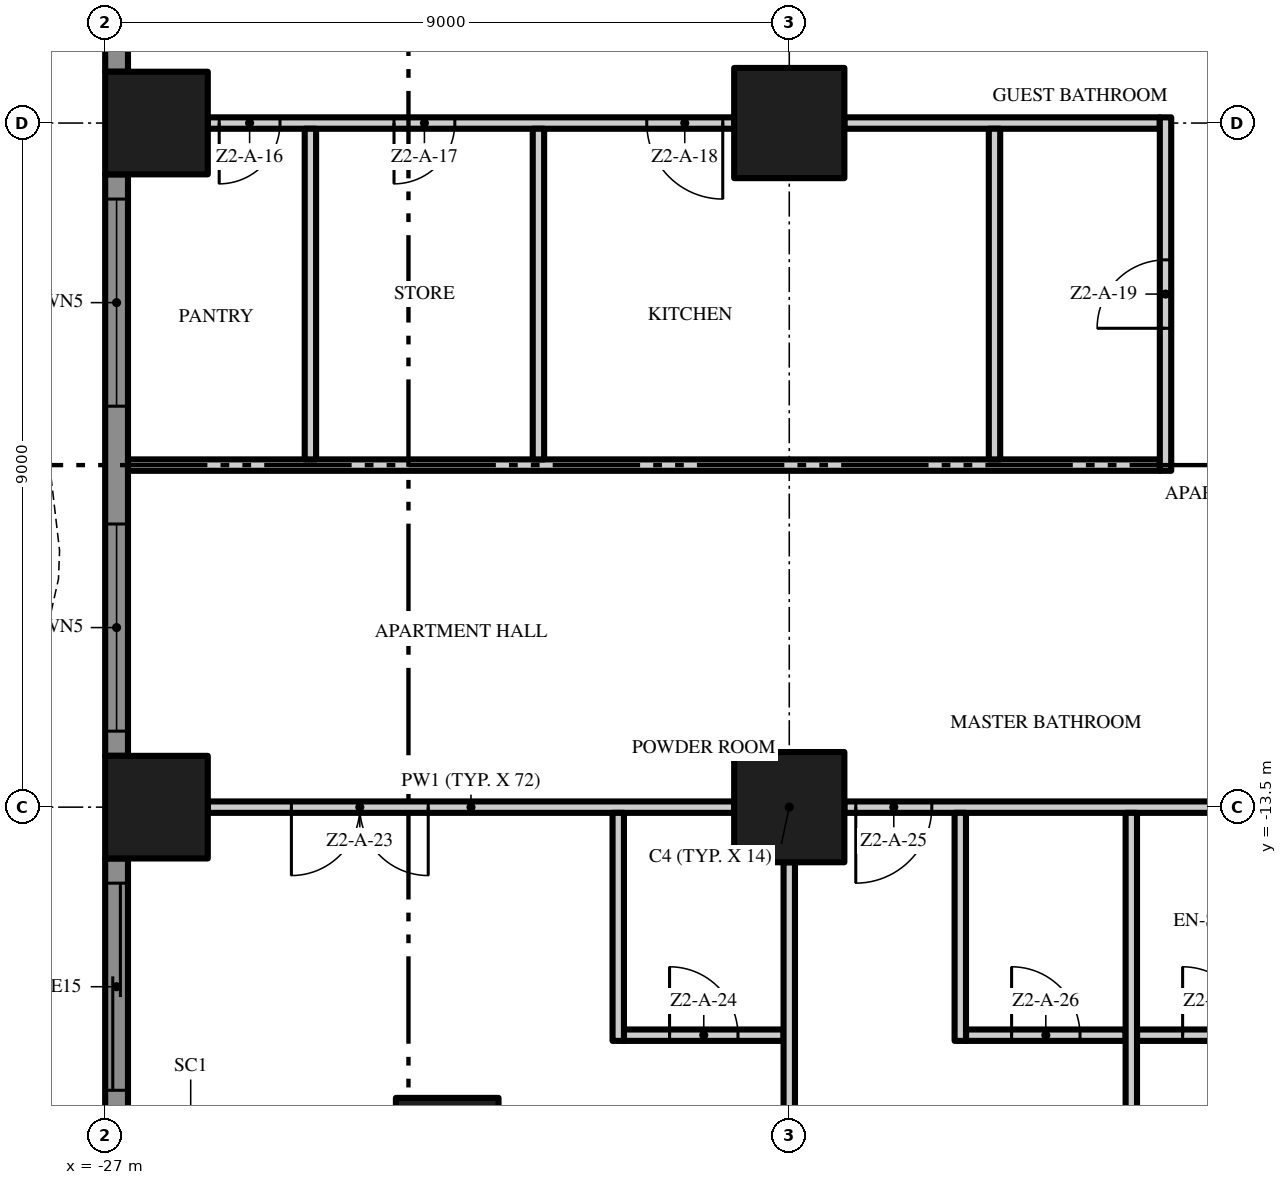
"""IFC4 building model, lengths in metres.
Left out: names, types, materials, properties, quantities, classifications, styles, units other than length and angle.
Written with IfcOpenShell. Run it as: python <this file> out.ifc"""

import sys

from ifc_helpers import new_model, si_unit, direction, frame, frame_2d, origin, origin_2d, place, context, subcontext, project, spatial, polyline, rectangle, outline, extrude, element, fill, save


model = new_model("IFC4")
c1 = context("Model", 3, precision=1e-05, world=origin(), true_north=direction((0.0, 1.0)))
c2 = subcontext(c1, "Body", "Model", "MODEL_VIEW")
j1 = project(units=[si_unit("LENGTHUNIT", "METRE"), si_unit("PLANEANGLEUNIT", "RADIAN")], contexts=[c1])
p1 = place(None, origin())
s1 = spatial("IfcSite", under=j1, at=p1, CompositionType="ELEMENT")
p2 = place(p1, origin())
s2 = spatial("IfcBuilding", under=s1, at=p2, CompositionType="ELEMENT")
p3 = place(p2, frame((0.0, 0.0, 73.2)))
s3 = spatial("IfcBuildingStorey", under=s2, at=p3, CompositionType="ELEMENT", Elevation=73.2)
for number, where, z_axis, x_axis in (
    (1, (-18.0, -13.5, 0.0), (0.0, 0.0, 1.0), (1.0, 0.0, 0.0)),
    (2, (-18.0, -4.5, 0.0), (0.0, 0.0, 1.0), (1.0, 0.0, 0.0)),
):
    element("IfcColumn", number, at=place(p3, frame(where, z_axis=z_axis, x_axis=x_axis)), inside=s3, PredefinedType="COLUMN", context=c2, shape_type="SweptSolid", body=[
        extrude(rectangle(XDim=1.45, YDim=1.45, at=origin_2d()), origin(), (0.0, 0.0, 1.0), 3.5),
    ])
for number, where, z_axis, x_axis in (
    (3, (-26.325, -13.5, 0.0), (0.0, 0.0, 1.0), (1.0, 0.0, 0.0)),
    (4, (-22.5, -18.0, 0.0), (0.0, 0.0, 1.0), (1.0, 0.0, 0.0)),
    (5, (-26.325, -4.5, 0.0), (0.0, 0.0, 1.0), (1.0, 0.0, 0.0)),
):
    element("IfcColumn", number, at=place(p3, frame(where, z_axis=z_axis, x_axis=x_axis)), inside=s3, PredefinedType="COLUMN", context=c2, shape_type="SweptSolid", body=[
        extrude(rectangle(XDim=1.35, YDim=1.35, at=origin_2d()), origin(), (0.0, 0.0, 1.0), 3.5),
    ])
p4 = place(p3, frame((-26.85, -3.825, 0.0), z_axis=(0.0, 0.0, 1.0), x_axis=(0.0, 1.0, 0.0)))
e6 = element("IfcWall", 6, at=p4, inside=s3, PredefinedType="SOLIDWALL", context=c2, shape_type="SweptSolid", body=[
    extrude(rectangle(XDim=7.65, YDim=0.3, at=frame_2d((3.825, 0.0))), origin(), (0.0, 0.0, 1.0), 3.5),
])
p5 = place(p4, frame((4.6, 0.0, 0.45)))
e7 = element("IfcOpeningElement", 7, at=p5, cuts=e6, PredefinedType="OPENING", context=c2, shape_type="SweptSolid", body=[
    extrude(rectangle(XDim=2.725, YDim=2.65, at=frame_2d((1.363, 1.325))), frame((0.0, 0.16, 0.0), z_axis=(0.0, -1.0, 0.0), x_axis=(1.0, 0.0, 0.0)), (0.0, 0.0, 1.0), 0.32),
])
p6 = place(p4, frame((0.325, 0.0, 0.0)))
e8 = element("IfcOpeningElement", 8, at=p6, cuts=e6, PredefinedType="OPENING", context=c2, shape_type="SweptSolid", body=[
    extrude(rectangle(XDim=2.725, YDim=2.4, at=frame_2d((1.363, 1.2))), frame((0.0, 0.16, 0.0), z_axis=(0.0, -1.0, 0.0), x_axis=(1.0, 0.0, 0.0)), (0.0, 0.0, 1.0), 0.32),
])
p7 = place(p3, frame((-26.85, -12.825, 0.0), z_axis=(0.0, 0.0, 1.0), x_axis=(0.0, 1.0, 0.0)))
e9 = element("IfcWall", 9, at=p7, inside=s3, PredefinedType="SOLIDWALL", context=c2, shape_type="SweptSolid", body=[
    extrude(rectangle(XDim=7.65, YDim=0.3, at=frame_2d((3.825, 0.0))), origin(), (0.0, 0.0, 1.0), 3.5),
])
p8 = place(p7, frame((4.6, 0.0, 0.45)))
e10 = element("IfcOpeningElement", 10, at=p8, cuts=e9, PredefinedType="OPENING", context=c2, shape_type="SweptSolid", body=[
    extrude(rectangle(XDim=2.725, YDim=2.65, at=frame_2d((1.363, 1.325))), frame((0.0, 0.16, 0.0), z_axis=(0.0, -1.0, 0.0), x_axis=(1.0, 0.0, 0.0)), (0.0, 0.0, 1.0), 0.32),
])
p9 = place(p7, frame((0.325, 0.0, 0.45)))
e11 = element("IfcOpeningElement", 11, at=p9, cuts=e9, PredefinedType="OPENING", context=c2, shape_type="SweptSolid", body=[
    extrude(rectangle(XDim=2.725, YDim=2.65, at=frame_2d((1.363, 1.325))), frame((0.0, 0.16, 0.0), z_axis=(0.0, -1.0, 0.0), x_axis=(1.0, 0.0, 0.0)), (0.0, 0.0, 1.0), 0.32),
])
p10 = place(p3, frame((-26.85, -18.0, 0.0), z_axis=(0.0, 0.0, 1.0), x_axis=(0.0, 1.0, 0.0)))
e12 = element("IfcWall", 12, at=p10, inside=s3, PredefinedType="SOLIDWALL", context=c2, shape_type="SweptSolid", body=[
    extrude(rectangle(XDim=3.825, YDim=0.3, at=frame_2d((1.913, 0.0))), origin(), (0.0, 0.0, 1.0), 3.5),
])
p11 = place(p10, frame((0.775, 0.0, 0.0)))
e13 = element("IfcOpeningElement", 13, at=p11, cuts=e12, PredefinedType="OPENING", context=c2, shape_type="SweptSolid", body=[
    extrude(rectangle(XDim=2.725, YDim=2.4, at=frame_2d((1.363, 1.2))), frame((0.0, 0.16, 0.0), z_axis=(0.0, -1.0, 0.0), x_axis=(1.0, 0.0, 0.0)), (0.0, 0.0, 1.0), 0.32),
])
p12 = place(p3, origin())
e14 = element("IfcWall", 14, at=p12, inside=s3, PredefinedType="USERDEFINED", context=c2, shape_type="SweptSolid", body=[
    extrude(outline(polyline([(-27.951, 18.0), (-28.612, 16.5), (-29.345, 15.0), (-29.869, 13.5), (-30.0, 12.375), (-29.985, 12.0), (-29.649, 10.5), (-28.988, 9.0), (-28.255, 7.5), (-27.731, 6.0), (-27.6, 4.875), (-27.615, 4.5), (-27.951, 3.0), (-28.612, 1.5), (-29.345, 0.0), (-29.869, -1.5), (-30.0, -2.625), (-29.985, -3.0), (-29.649, -4.5), (-28.988, -6.0), (-28.255, -7.5), (-27.731, -9.0), (-27.6, -10.125), (-27.615, -10.5), (-27.951, -12.0), (-28.612, -13.5), (-29.345, -15.0), (-29.869, -16.5), (-30.0, -17.625), (-29.985, -18.0), (-29.735, -17.99), (-29.749, -17.635), (-29.624, -16.556), (-29.114, -15.096), (-28.385, -13.605), (-27.713, -12.079), (-27.366, -10.533), (-27.349, -10.115), (-27.486, -8.944), (-28.024, -7.404), (-28.761, -5.895), (-29.41, -4.421), (-29.736, -2.967), (-29.749, -2.635), (-29.624, -1.556), (-29.114, -0.096), (-28.385, 1.395), (-27.713, 2.921), (-27.366, 4.467), (-27.349, 4.885), (-27.486, 6.056), (-28.024, 7.596), (-28.761, 9.105), (-29.41, 10.579), (-29.736, 12.033), (-29.749, 12.365), (-29.624, 13.444), (-29.114, 14.904), (-28.385, 16.395), (-27.723, 17.899), (-27.951, 18.0)])), origin(), (0.0, 0.0, 1.0), 0.9),
])
p13 = place(p3, frame((-20.175, -16.5, 0.0), z_axis=(0.0, 0.0, 1.0), x_axis=(1.0, 0.0, 0.0)))
e15 = element("IfcWall", 15, at=p13, inside=s3, PredefinedType="PARTITIONING", context=c2, shape_type="SweptSolid", body=[
    extrude(rectangle(XDim=2.1, YDim=0.15, at=frame_2d((1.05, 0.0))), origin(), (0.0, 0.0, 1.0), 3.5),
])
p14 = place(p13, frame((0.6, 0.0, 0.0)))
e16 = element("IfcOpeningElement", 16, at=p14, cuts=e15, PredefinedType="OPENING", context=c2, shape_type="SweptSolid", body=[
    extrude(rectangle(XDim=0.9, YDim=2.1, at=frame_2d((0.45, 1.05))), frame((0.0, 0.085, 0.0), z_axis=(0.0, -1.0, 0.0), x_axis=(1.0, 0.0, 0.0)), (0.0, 0.0, 1.0), 0.17),
])
p15 = place(p3, frame((-15.675, -16.5, 0.0), z_axis=(0.0, 0.0, 1.0), x_axis=(1.0, 0.0, 0.0)))
e17 = element("IfcWall", 17, at=p15, inside=s3, PredefinedType="PARTITIONING", context=c2, shape_type="SweptSolid", body=[
    extrude(rectangle(XDim=2.1, YDim=0.15, at=frame_2d((1.05, 0.0))), origin(), (0.0, 0.0, 1.0), 3.5),
])
p16 = place(p15, frame((0.6, 0.0, 0.0)))
e18 = element("IfcOpeningElement", 18, at=p16, cuts=e17, PredefinedType="OPENING", context=c2, shape_type="SweptSolid", body=[
    extrude(rectangle(XDim=0.9, YDim=2.1, at=frame_2d((0.45, 1.05))), frame((0.0, 0.085, 0.0), z_axis=(0.0, -1.0, 0.0), x_axis=(1.0, 0.0, 0.0)), (0.0, 0.0, 1.0), 0.17),
])
p17 = place(p3, frame((-13.425, -16.5, 0.0), z_axis=(0.0, 0.0, 1.0), x_axis=(1.0, 0.0, 0.0)))
e19 = element("IfcWall", 19, at=p17, inside=s3, PredefinedType="PARTITIONING", context=c2, shape_type="SweptSolid", body=[
    extrude(rectangle(XDim=2.1, YDim=0.15, at=frame_2d((1.05, 0.0))), origin(), (0.0, 0.0, 1.0), 3.5),
])
p18 = place(p17, frame((0.6, 0.0, 0.0)))
e20 = element("IfcOpeningElement", 20, at=p18, cuts=e19, PredefinedType="OPENING", context=c2, shape_type="SweptSolid", body=[
    extrude(rectangle(XDim=0.9, YDim=2.1, at=frame_2d((0.45, 1.05))), frame((0.0, 0.085, 0.0), z_axis=(0.0, -1.0, 0.0), x_axis=(1.0, 0.0, 0.0)), (0.0, 0.0, 1.0), 0.17),
])
p19 = place(p3, frame((-18.725, -13.5, 0.0), z_axis=(0.0, 0.0, 1.0), x_axis=(-1.0, 0.0, 0.0)))
e21 = element("IfcWall", 21, at=p19, inside=s3, PredefinedType="PARTITIONING", context=c2, shape_type="SweptSolid", body=[
    extrude(rectangle(XDim=6.925, YDim=0.15, at=frame_2d((3.462, 0.0))), origin(), (0.0, 0.0, 1.0), 3.5),
])
p20 = place(p19, frame((4.025, 0.0, 0.0)))
e22 = element("IfcOpeningElement", 22, at=p20, cuts=e21, PredefinedType="OPENING", context=c2, shape_type="SweptSolid", body=[
    extrude(rectangle(XDim=1.8, YDim=2.4, at=frame_2d((0.9, 1.2))), frame((0.0, 0.085, 0.0), z_axis=(0.0, -1.0, 0.0), x_axis=(1.0, 0.0, 0.0)), (0.0, 0.0, 1.0), 0.17),
])
p21 = place(p3, frame((-9.725, -13.5, 0.0), z_axis=(0.0, 0.0, 1.0), x_axis=(-1.0, 0.0, 0.0)))
e23 = element("IfcWall", 23, at=p21, inside=s3, PredefinedType="PARTITIONING", context=c2, shape_type="SweptSolid", body=[
    extrude(rectangle(XDim=7.55, YDim=0.15, at=frame_2d((3.775, 0.0))), origin(), (0.0, 0.0, 1.0), 3.5),
])
p22 = place(p21, frame((6.4, 0.0, 0.0)))
e24 = element("IfcOpeningElement", 24, at=p22, cuts=e23, PredefinedType="OPENING", context=c2, shape_type="SweptSolid", body=[
    extrude(rectangle(XDim=1.0, YDim=2.4, at=frame_2d((0.5, 1.2))), frame((0.0, 0.085, 0.0), z_axis=(0.0, -1.0, 0.0), x_axis=(1.0, 0.0, 0.0)), (0.0, 0.0, 1.0), 0.17),
])
p23 = place(p21, frame((0.15, 0.0, 0.0)))
e25 = element("IfcOpeningElement", 25, at=p23, cuts=e23, PredefinedType="OPENING", context=c2, shape_type="SweptSolid", body=[
    extrude(rectangle(XDim=1.0, YDim=2.4, at=frame_2d((0.5, 1.2))), frame((0.0, 0.085, 0.0), z_axis=(0.0, -1.0, 0.0), x_axis=(1.0, 0.0, 0.0)), (0.0, 0.0, 1.0), 0.17),
])
p24 = place(p3, frame((-26.7, -9.0, 0.0), z_axis=(0.0, 0.0, 1.0), x_axis=(1.0, 0.0, 0.0)))
e26 = element("IfcWall", 26, at=p24, inside=s3, PredefinedType="PARTITIONING", context=c2, shape_type="SweptSolid", body=[
    extrude(rectangle(XDim=13.575, YDim=0.15, at=frame_2d((6.787, 0.0))), origin(), (0.0, 0.0, 1.0), 3.5),
])
p25 = place(p3, frame((-18.725, -4.5, 0.0), z_axis=(0.0, 0.0, 1.0), x_axis=(-1.0, 0.0, 0.0)))
e27 = element("IfcWall", 27, at=p25, inside=s3, PredefinedType="PARTITIONING", context=c2, shape_type="SweptSolid", body=[
    extrude(rectangle(XDim=6.925, YDim=0.15, at=frame_2d((3.462, 0.0))), origin(), (0.0, 0.0, 1.0), 3.5),
])
p26 = place(p25, frame((5.975, 0.0, 0.0)))
e28 = element("IfcOpeningElement", 28, at=p26, cuts=e27, PredefinedType="OPENING", context=c2, shape_type="SweptSolid", body=[
    extrude(rectangle(XDim=0.8, YDim=2.0, at=frame_2d((0.4, 1.0))), frame((0.0, 0.085, 0.0), z_axis=(0.0, -1.0, 0.0), x_axis=(1.0, 0.0, 0.0)), (0.0, 0.0, 1.0), 0.17),
])
p27 = place(p25, frame((3.675, 0.0, 0.0)))
e29 = element("IfcOpeningElement", 29, at=p27, cuts=e27, PredefinedType="OPENING", context=c2, shape_type="SweptSolid", body=[
    extrude(rectangle(XDim=0.8, YDim=2.0, at=frame_2d((0.4, 1.0))), frame((0.0, 0.085, 0.0), z_axis=(0.0, -1.0, 0.0), x_axis=(1.0, 0.0, 0.0)), (0.0, 0.0, 1.0), 0.17),
])
p28 = place(p25, frame((0.15, 0.0, 0.0)))
e30 = element("IfcOpeningElement", 30, at=p28, cuts=e27, PredefinedType="OPENING", context=c2, shape_type="SweptSolid", body=[
    extrude(rectangle(XDim=1.0, YDim=2.4, at=frame_2d((0.5, 1.2))), frame((0.0, 0.085, 0.0), z_axis=(0.0, -1.0, 0.0), x_axis=(1.0, 0.0, 0.0)), (0.0, 0.0, 1.0), 0.17),
])
p29 = place(p3, frame((-17.275, -4.5, 0.0), z_axis=(0.0, 0.0, 1.0), x_axis=(1.0, 0.0, 0.0)))
e31 = element("IfcWall", 31, at=p29, inside=s3, PredefinedType="PARTITIONING", context=c2, shape_type="SweptSolid", body=[
    extrude(rectangle(XDim=4.15, YDim=0.15, at=frame_2d((2.075, 0.0))), origin(), (0.0, 0.0, 1.0), 3.5),
])
for number, where, z_axis, x_axis in (
    (32, (-24.3, -8.925, 0.0), (0.0, 0.0, 1.0), (0.0, 1.0, 0.0)),
    (33, (-21.3, -8.925, 0.0), (0.0, 0.0, 1.0), (0.0, 1.0, 0.0)),
):
    element("IfcWall", number, at=place(p3, frame(where, z_axis=z_axis, x_axis=x_axis)), inside=s3, PredefinedType="PARTITIONING", context=c2, shape_type="SweptSolid", body=[
        extrude(rectangle(XDim=4.35, YDim=0.15, at=frame_2d((2.175, 0.0))), origin(), (0.0, 0.0, 1.0), 3.5),
    ])
p30 = place(p3, frame((-20.25, -16.575, 0.0), z_axis=(0.0, 0.0, 1.0), x_axis=(0.0, 1.0, 0.0)))
e34 = element("IfcWall", 34, at=p30, inside=s3, PredefinedType="PARTITIONING", context=c2, shape_type="SweptSolid", body=[
    extrude(rectangle(XDim=3.0, YDim=0.15, at=frame_2d((1.5, 0.0))), origin(), (0.0, 0.0, 1.0), 3.5),
])
p31 = place(p3, frame((-18.0, -21.15, 0.0), z_axis=(0.0, 0.0, 1.0), x_axis=(0.0, 1.0, 0.0)))
e35 = element("IfcWall", 35, at=p31, inside=s3, PredefinedType="PARTITIONING", context=c2, shape_type="SweptSolid", body=[
    extrude(rectangle(XDim=6.925, YDim=0.15, at=frame_2d((3.462, 0.0))), origin(), (0.0, 0.0, 1.0), 3.5),
])
p32 = place(p3, frame((-15.75, -16.575, 0.0), z_axis=(0.0, 0.0, 1.0), x_axis=(0.0, 1.0, 0.0)))
e36 = element("IfcWall", 36, at=p32, inside=s3, PredefinedType="PARTITIONING", context=c2, shape_type="SweptSolid", body=[
    extrude(rectangle(XDim=3.0, YDim=0.15, at=frame_2d((1.5, 0.0))), origin(), (0.0, 0.0, 1.0), 3.5),
])
p33 = place(p3, frame((-15.3, -8.925, 0.0), z_axis=(0.0, 0.0, 1.0), x_axis=(0.0, 1.0, 0.0)))
e37 = element("IfcWall", 37, at=p33, inside=s3, PredefinedType="PARTITIONING", context=c2, shape_type="SweptSolid", body=[
    extrude(rectangle(XDim=4.35, YDim=0.15, at=frame_2d((2.175, 0.0))), origin(), (0.0, 0.0, 1.0), 3.5),
])
p34 = place(p3, frame((-13.5, -22.2, 0.0), z_axis=(0.0, 0.0, 1.0), x_axis=(0.0, 1.0, 0.0)))
e38 = element("IfcWall", 38, at=p34, inside=s3, PredefinedType="PARTITIONING", context=c2, shape_type="SweptSolid", body=[
    extrude(rectangle(XDim=8.625, YDim=0.15, at=frame_2d((4.312, 0.0))), origin(), (0.0, 0.0, 1.0), 3.5),
])
p35 = place(p3, frame((-13.05, -9.075, 0.0), z_axis=(0.0, 0.0, 1.0), x_axis=(0.0, 1.0, 0.0)))
e39 = element("IfcWall", 39, at=p35, inside=s3, PredefinedType="PARTITIONING", context=c2, shape_type="SweptSolid", body=[
    extrude(rectangle(XDim=4.65, YDim=0.15, at=frame_2d((2.325, 0.0))), origin(), (0.0, 0.0, 1.0), 3.5),
])
p36 = place(p35, frame((1.875, 0.0, 0.0)))
e40 = element("IfcOpeningElement", 40, at=p36, cuts=e39, PredefinedType="OPENING", context=c2, shape_type="SweptSolid", body=[
    extrude(rectangle(XDim=0.9, YDim=2.1, at=frame_2d((0.45, 1.05))), frame((0.0, 0.085, 0.0), z_axis=(0.0, -1.0, 0.0), x_axis=(1.0, 0.0, 0.0)), (0.0, 0.0, 1.0), 0.17),
])
p37 = place(p8, origin())
e41 = element("IfcWindow", 41, at=p37, inside=s3, PartitioningType="SINGLE_PANEL", PredefinedType="WINDOW", context=c2, shape_type="SweptSolid", body=[
    extrude(rectangle(XDim=2.725, YDim=2.65, at=frame_2d((1.363, 1.325))), frame((0.0, 0.03, 0.0), z_axis=(0.0, -1.0, 0.0), x_axis=(1.0, 0.0, 0.0)), (0.0, 0.0, 1.0), 0.06),
])
fill(e10, e41)
p38 = place(p9, origin())
e42 = element("IfcWindow", 42, at=p38, inside=s3, PartitioningType="SINGLE_PANEL", PredefinedType="WINDOW", context=c2, shape_type="SweptSolid", body=[
    extrude(rectangle(XDim=2.725, YDim=2.65, at=frame_2d((1.363, 1.325))), frame((0.0, 0.03, 0.0), z_axis=(0.0, -1.0, 0.0), x_axis=(1.0, 0.0, 0.0)), (0.0, 0.0, 1.0), 0.06),
])
fill(e11, e42)
p39 = place(p11, origin())
e43 = element("IfcDoor", 43, at=p39, inside=s3, OperationType="SINGLE_SWING_LEFT", PredefinedType="DOOR", context=c2, shape_type="SweptSolid", body=[
    extrude(rectangle(XDim=2.725, YDim=2.4, at=frame_2d((1.363, 1.2))), frame((0.0, 0.025, 0.0), z_axis=(0.0, -1.0, 0.0), x_axis=(1.0, 0.0, 0.0)), (0.0, 0.0, 1.0), 0.05),
])
fill(e13, e43)
p40 = place(p26, origin())
e44 = element("IfcDoor", 44, at=p40, inside=s3, OperationType="SINGLE_SWING_RIGHT", PredefinedType="DOOR", context=c2, shape_type="SweptSolid", body=[
    extrude(rectangle(XDim=0.8, YDim=2.0, at=frame_2d((0.4, 1.0))), frame((0.0, 0.025, 0.0), z_axis=(0.0, -1.0, 0.0), x_axis=(1.0, 0.0, 0.0)), (0.0, 0.0, 1.0), 0.05),
])
fill(e28, e44)
p41 = place(p27, origin())
e45 = element("IfcDoor", 45, at=p41, inside=s3, OperationType="SINGLE_SWING_RIGHT", PredefinedType="DOOR", context=c2, shape_type="SweptSolid", body=[
    extrude(rectangle(XDim=0.8, YDim=2.0, at=frame_2d((0.4, 1.0))), frame((0.0, 0.025, 0.0), z_axis=(0.0, -1.0, 0.0), x_axis=(1.0, 0.0, 0.0)), (0.0, 0.0, 1.0), 0.05),
])
fill(e29, e45)
p42 = place(p28, origin())
e46 = element("IfcDoor", 46, at=p42, inside=s3, OperationType="SINGLE_SWING_LEFT", PredefinedType="DOOR", context=c2, shape_type="SweptSolid", body=[
    extrude(rectangle(XDim=1.0, YDim=2.4, at=frame_2d((0.5, 1.2))), frame((0.0, 0.025, 0.0), z_axis=(0.0, -1.0, 0.0), x_axis=(1.0, 0.0, 0.0)), (0.0, 0.0, 1.0), 0.05),
])
fill(e30, e46)
p43 = place(p36, origin())
e47 = element("IfcDoor", 47, at=p43, inside=s3, OperationType="SINGLE_SWING_LEFT", PredefinedType="DOOR", context=c2, shape_type="SweptSolid", body=[
    extrude(rectangle(XDim=0.9, YDim=2.1, at=frame_2d((0.45, 1.05))), frame((0.0, 0.025, 0.0), z_axis=(0.0, -1.0, 0.0), x_axis=(1.0, 0.0, 0.0)), (0.0, 0.0, 1.0), 0.05),
])
fill(e40, e47)
p44 = place(p20, origin())
e48 = element("IfcDoor", 48, at=p44, inside=s3, OperationType="DOUBLE_DOOR_SINGLE_SWING", PredefinedType="DOOR", context=c2, shape_type="SweptSolid", body=[
    extrude(rectangle(XDim=1.8, YDim=2.4, at=frame_2d((0.9, 1.2))), frame((0.0, 0.025, 0.0), z_axis=(0.0, -1.0, 0.0), x_axis=(1.0, 0.0, 0.0)), (0.0, 0.0, 1.0), 0.05),
])
fill(e22, e48)
p45 = place(p14, origin())
e49 = element("IfcDoor", 49, at=p45, inside=s3, OperationType="SINGLE_SWING_LEFT", PredefinedType="DOOR", context=c2, shape_type="SweptSolid", body=[
    extrude(rectangle(XDim=0.9, YDim=2.1, at=frame_2d((0.45, 1.05))), frame((0.0, 0.025, 0.0), z_axis=(0.0, -1.0, 0.0), x_axis=(1.0, 0.0, 0.0)), (0.0, 0.0, 1.0), 0.05),
])
fill(e16, e49)
p46 = place(p22, origin())
e50 = element("IfcDoor", 50, at=p46, inside=s3, OperationType="SINGLE_SWING_RIGHT", PredefinedType="DOOR", context=c2, shape_type="SweptSolid", body=[
    extrude(rectangle(XDim=1.0, YDim=2.4, at=frame_2d((0.5, 1.2))), frame((0.0, 0.025, 0.0), z_axis=(0.0, -1.0, 0.0), x_axis=(1.0, 0.0, 0.0)), (0.0, 0.0, 1.0), 0.05),
])
fill(e24, e50)
p47 = place(p16, origin())
e51 = element("IfcDoor", 51, at=p47, inside=s3, OperationType="SINGLE_SWING_LEFT", PredefinedType="DOOR", context=c2, shape_type="SweptSolid", body=[
    extrude(rectangle(XDim=0.9, YDim=2.1, at=frame_2d((0.45, 1.05))), frame((0.0, 0.025, 0.0), z_axis=(0.0, -1.0, 0.0), x_axis=(1.0, 0.0, 0.0)), (0.0, 0.0, 1.0), 0.05),
])
fill(e18, e51)
p48 = place(p18, origin())
e52 = element("IfcDoor", 52, at=p48, inside=s3, OperationType="SINGLE_SWING_LEFT", PredefinedType="DOOR", context=c2, shape_type="SweptSolid", body=[
    extrude(rectangle(XDim=0.9, YDim=2.1, at=frame_2d((0.45, 1.05))), frame((0.0, 0.025, 0.0), z_axis=(0.0, -1.0, 0.0), x_axis=(1.0, 0.0, 0.0)), (0.0, 0.0, 1.0), 0.05),
])
fill(e20, e52)
save(model, sys.argv[1])
